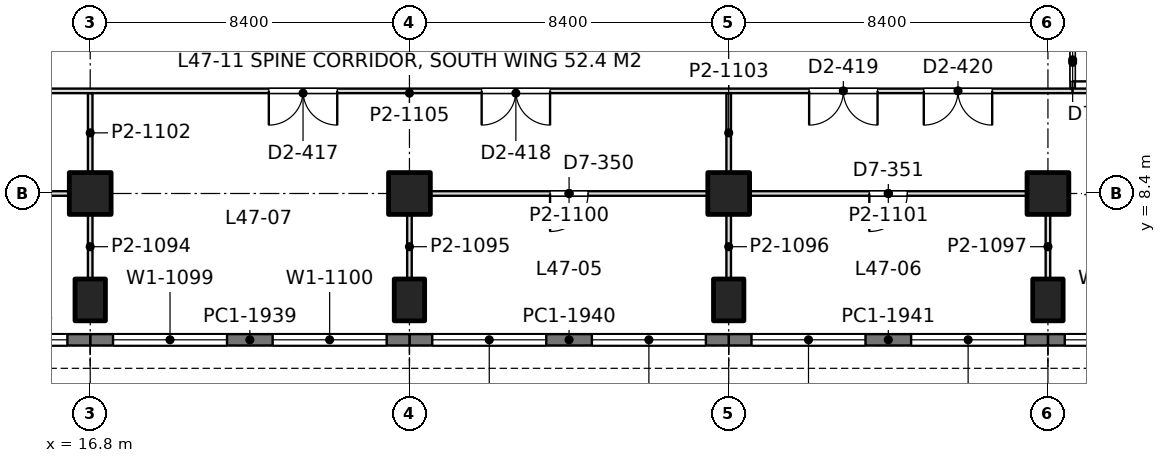
"""IFC4 building model, lengths in metres.
Left out: names, types, materials, properties, quantities, classifications, styles, units other than length and angle.
Written with IfcOpenShell. Run it as: python <this file> out.ifc"""

import sys

from ifc_helpers import new_model, si_unit, direction, frame, frame_2d, origin, origin_2d, place, context, subcontext, project, spatial, rectangle, extrude, element, fill, save


model = new_model("IFC4")
c1 = context("Model", 3, precision=1e-05, world=origin(), true_north=direction((0.0, 1.0)))
c2 = subcontext(c1, "Body", "Model", "MODEL_VIEW")
j1 = project(units=[si_unit("LENGTHUNIT", "METRE"), si_unit("PLANEANGLEUNIT", "RADIAN")], contexts=[c1])
p1 = place(None, origin())
s1 = spatial("IfcSite", under=j1, at=p1, CompositionType="ELEMENT")
p2 = place(p1, origin())
s2 = spatial("IfcBuilding", under=s1, at=p2, CompositionType="ELEMENT")
p3 = place(p2, frame((0.0, 0.0, 207.0)))
s3 = spatial("IfcBuildingStorey", under=s2, at=p3, CompositionType="ELEMENT", Elevation=207.0)
p4 = place(p3, frame((16.8, 5.6, 0.0), z_axis=(0.0, 0.0, 1.0), x_axis=(1.0, 0.0, 0.0)))
e1 = element("IfcColumn", 1, at=p4, inside=s3, PredefinedType="COLUMN", context=c2, shape_type="SweptSolid", body=[
    extrude(rectangle(XDim=0.8, YDim=1.1, at=origin_2d()), origin(), (0.0, 0.0, 1.0), 4.2),
])
p5 = place(p3, frame((16.8, 8.4, 0.0), z_axis=(0.0, 0.0, 1.0), x_axis=(1.0, 0.0, 0.0)))
e2 = element("IfcColumn", 2, at=p5, inside=s3, PredefinedType="COLUMN", context=c2, shape_type="SweptSolid", body=[
    extrude(rectangle(XDim=1.1, YDim=1.1, at=origin_2d()), origin(), (0.0, 0.0, 1.0), 4.2),
])
p6 = place(p3, frame((25.2, 5.6, 0.0), z_axis=(0.0, 0.0, 1.0), x_axis=(1.0, 0.0, 0.0)))
e3 = element("IfcColumn", 3, at=p6, inside=s3, PredefinedType="COLUMN", context=c2, shape_type="SweptSolid", body=[
    extrude(rectangle(XDim=0.8, YDim=1.1, at=origin_2d()), origin(), (0.0, 0.0, 1.0), 4.2),
])
p7 = place(p3, frame((25.2, 8.4, 0.0), z_axis=(0.0, 0.0, 1.0), x_axis=(1.0, 0.0, 0.0)))
e4 = element("IfcColumn", 4, at=p7, inside=s3, PredefinedType="COLUMN", context=c2, shape_type="SweptSolid", body=[
    extrude(rectangle(XDim=1.1, YDim=1.1, at=origin_2d()), origin(), (0.0, 0.0, 1.0), 4.2),
])
p8 = place(p3, frame((33.6, 5.6, 0.0), z_axis=(0.0, 0.0, 1.0), x_axis=(1.0, 0.0, 0.0)))
e5 = element("IfcColumn", 5, at=p8, inside=s3, PredefinedType="COLUMN", context=c2, shape_type="SweptSolid", body=[
    extrude(rectangle(XDim=0.8, YDim=1.1, at=origin_2d()), origin(), (0.0, 0.0, 1.0), 4.2),
])
p9 = place(p3, frame((33.6, 8.4, 0.0), z_axis=(0.0, 0.0, 1.0), x_axis=(1.0, 0.0, 0.0)))
e6 = element("IfcColumn", 6, at=p9, inside=s3, PredefinedType="COLUMN", context=c2, shape_type="SweptSolid", body=[
    extrude(rectangle(XDim=1.1, YDim=1.1, at=origin_2d()), origin(), (0.0, 0.0, 1.0), 4.2),
])
p10 = place(p3, frame((42.0, 5.6, 0.0), z_axis=(0.0, 0.0, 1.0), x_axis=(1.0, 0.0, 0.0)))
e7 = element("IfcColumn", 7, at=p10, inside=s3, PredefinedType="COLUMN", context=c2, shape_type="SweptSolid", body=[
    extrude(rectangle(XDim=0.8, YDim=1.1, at=origin_2d()), origin(), (0.0, 0.0, 1.0), 4.2),
])
p11 = place(p3, frame((42.0, 8.4, 0.0), z_axis=(0.0, 0.0, 1.0), x_axis=(1.0, 0.0, 0.0)))
e8 = element("IfcColumn", 8, at=p11, inside=s3, PredefinedType="COLUMN", context=c2, shape_type="SweptSolid", body=[
    extrude(rectangle(XDim=1.1, YDim=1.1, at=origin_2d()), origin(), (0.0, 0.0, 1.0), 4.2),
])
p12 = place(p3, frame((50.085, 4.55, 0.0), z_axis=(0.0, 0.0, 1.0), x_axis=(-1.0, 0.0, 0.0)))
e9 = element("IfcWall", 9, at=p12, inside=s3, PredefinedType="SOLIDWALL", context=c2, shape_type="SweptSolid", body=[
    extrude(rectangle(XDim=8.085, YDim=0.3, at=frame_2d((4.042, 0.0))), origin(), (0.0, 0.0, 1.0), 4.05),
])
p13 = place(p12, frame((0.443, 0.0, 0.9)))
e10 = element("IfcOpeningElement", 10, at=p13, cuts=e9, PredefinedType="OPENING", context=c2, shape_type="SweptSolid", body=[
    extrude(rectangle(XDim=3.0, YDim=1.9, at=frame_2d((1.5, 0.95))), frame((0.0, 0.16, 0.0), z_axis=(0.0, -1.0, 0.0), x_axis=(1.0, 0.0, 0.0)), (0.0, 0.0, 1.0), 0.32),
])
p14 = place(p12, frame((4.643, 0.0, 0.9)))
e11 = element("IfcOpeningElement", 11, at=p14, cuts=e9, PredefinedType="OPENING", context=c2, shape_type="SweptSolid", body=[
    extrude(rectangle(XDim=3.0, YDim=1.9, at=frame_2d((1.5, 0.95))), frame((0.0, 0.16, 0.0), z_axis=(0.0, -1.0, 0.0), x_axis=(1.0, 0.0, 0.0)), (0.0, 0.0, 1.0), 0.32),
])
p15 = place(p3, frame((42.0, 4.55, 0.0), z_axis=(0.0, 0.0, 1.0), x_axis=(-1.0, 0.0, 0.0)))
e12 = element("IfcWall", 12, at=p15, inside=s3, PredefinedType="SOLIDWALL", context=c2, shape_type="SweptSolid", body=[
    extrude(rectangle(XDim=8.4, YDim=0.3, at=frame_2d((4.2, 0.0))), origin(), (0.0, 0.0, 1.0), 4.05),
])
p16 = place(p15, frame((0.6, 0.0, 0.9)))
e13 = element("IfcOpeningElement", 13, at=p16, cuts=e12, PredefinedType="OPENING", context=c2, shape_type="SweptSolid", body=[
    extrude(rectangle(XDim=3.0, YDim=1.9, at=frame_2d((1.5, 0.95))), frame((0.0, 0.16, 0.0), z_axis=(0.0, -1.0, 0.0), x_axis=(1.0, 0.0, 0.0)), (0.0, 0.0, 1.0), 0.32),
])
p17 = place(p15, frame((4.8, 0.0, 0.9)))
e14 = element("IfcOpeningElement", 14, at=p17, cuts=e12, PredefinedType="OPENING", context=c2, shape_type="SweptSolid", body=[
    extrude(rectangle(XDim=3.0, YDim=1.9, at=frame_2d((1.5, 0.95))), frame((0.0, 0.16, 0.0), z_axis=(0.0, -1.0, 0.0), x_axis=(1.0, 0.0, 0.0)), (0.0, 0.0, 1.0), 0.32),
])
p18 = place(p3, frame((33.6, 4.55, 0.0), z_axis=(0.0, 0.0, 1.0), x_axis=(-1.0, 0.0, 0.0)))
e15 = element("IfcWall", 15, at=p18, inside=s3, PredefinedType="SOLIDWALL", context=c2, shape_type="SweptSolid", body=[
    extrude(rectangle(XDim=8.4, YDim=0.3, at=frame_2d((4.2, 0.0))), origin(), (0.0, 0.0, 1.0), 4.05),
])
p19 = place(p18, frame((0.6, 0.0, 0.9)))
e16 = element("IfcOpeningElement", 16, at=p19, cuts=e15, PredefinedType="OPENING", context=c2, shape_type="SweptSolid", body=[
    extrude(rectangle(XDim=3.0, YDim=1.9, at=frame_2d((1.5, 0.95))), frame((0.0, 0.16, 0.0), z_axis=(0.0, -1.0, 0.0), x_axis=(1.0, 0.0, 0.0)), (0.0, 0.0, 1.0), 0.32),
])
p20 = place(p18, frame((4.8, 0.0, 0.9)))
e17 = element("IfcOpeningElement", 17, at=p20, cuts=e15, PredefinedType="OPENING", context=c2, shape_type="SweptSolid", body=[
    extrude(rectangle(XDim=3.0, YDim=1.9, at=frame_2d((1.5, 0.95))), frame((0.0, 0.16, 0.0), z_axis=(0.0, -1.0, 0.0), x_axis=(1.0, 0.0, 0.0)), (0.0, 0.0, 1.0), 0.32),
])
p21 = place(p3, frame((25.2, 4.55, 0.0), z_axis=(0.0, 0.0, 1.0), x_axis=(-1.0, 0.0, 0.0)))
e18 = element("IfcWall", 18, at=p21, inside=s3, PredefinedType="SOLIDWALL", context=c2, shape_type="SweptSolid", body=[
    extrude(rectangle(XDim=8.4, YDim=0.3, at=frame_2d((4.2, 0.0))), origin(), (0.0, 0.0, 1.0), 4.05),
])
p22 = place(p21, frame((0.6, 0.0, 0.9)))
e19 = element("IfcOpeningElement", 19, at=p22, cuts=e18, PredefinedType="OPENING", context=c2, shape_type="SweptSolid", body=[
    extrude(rectangle(XDim=3.0, YDim=1.9, at=frame_2d((1.5, 0.95))), frame((0.0, 0.16, 0.0), z_axis=(0.0, -1.0, 0.0), x_axis=(1.0, 0.0, 0.0)), (0.0, 0.0, 1.0), 0.32),
])
p23 = place(p21, frame((4.8, 0.0, 0.9)))
e20 = element("IfcOpeningElement", 20, at=p23, cuts=e18, PredefinedType="OPENING", context=c2, shape_type="SweptSolid", body=[
    extrude(rectangle(XDim=3.0, YDim=1.9, at=frame_2d((1.5, 0.95))), frame((0.0, 0.16, 0.0), z_axis=(0.0, -1.0, 0.0), x_axis=(1.0, 0.0, 0.0)), (0.0, 0.0, 1.0), 0.32),
])
p24 = place(p3, frame((16.8, 4.55, 0.0), z_axis=(0.0, 0.0, 1.0), x_axis=(-1.0, 0.0, 0.0)))
e21 = element("IfcWall", 21, at=p24, inside=s3, PredefinedType="SOLIDWALL", context=c2, shape_type="SweptSolid", body=[
    extrude(rectangle(XDim=8.4, YDim=0.3, at=frame_2d((4.2, 0.0))), origin(), (0.0, 0.0, 1.0), 4.05),
])
p25 = place(p24, frame((0.6, 0.0, 0.9)))
e22 = element("IfcOpeningElement", 22, at=p25, cuts=e21, PredefinedType="OPENING", context=c2, shape_type="SweptSolid", body=[
    extrude(rectangle(XDim=3.0, YDim=1.9, at=frame_2d((1.5, 0.95))), frame((0.0, 0.16, 0.0), z_axis=(0.0, -1.0, 0.0), x_axis=(1.0, 0.0, 0.0)), (0.0, 0.0, 1.0), 0.32),
])
p26 = place(p24, frame((4.8, 0.0, 0.9)))
e23 = element("IfcOpeningElement", 23, at=p26, cuts=e21, PredefinedType="OPENING", context=c2, shape_type="SweptSolid", body=[
    extrude(rectangle(XDim=3.0, YDim=1.9, at=frame_2d((1.5, 0.95))), frame((0.0, 0.16, 0.0), z_axis=(0.0, -1.0, 0.0), x_axis=(1.0, 0.0, 0.0)), (0.0, 0.0, 1.0), 0.32),
])
p27 = place(p3, frame((8.949, 8.4, 0.0), z_axis=(0.0, 0.0, 1.0), x_axis=(1.0, 0.0, 0.0)))
e24 = element("IfcWall", 24, at=p27, inside=s3, PredefinedType="PARTITIONING", context=c2, shape_type="SweptSolid", body=[
    extrude(rectangle(XDim=7.302, YDim=0.12, at=frame_2d((3.651, 0.0))), origin(), (0.0, 0.0, 1.0), 3.55),
])
p28 = place(p27, frame((1.051, 0.0, 0.0)))
e25 = element("IfcOpeningElement", 25, at=p28, cuts=e24, PredefinedType="OPENING", context=c2, shape_type="SweptSolid", body=[
    extrude(rectangle(XDim=1.0, YDim=2.4, at=frame_2d((0.5, 1.2))), frame((0.0, 0.07, 0.0), z_axis=(0.0, -1.0, 0.0), x_axis=(1.0, 0.0, 0.0)), (0.0, 0.0, 1.0), 0.14),
])
p29 = place(p27, frame((5.251, 0.0, 0.0)))
e26 = element("IfcOpeningElement", 26, at=p29, cuts=e24, PredefinedType="OPENING", context=c2, shape_type="SweptSolid", body=[
    extrude(rectangle(XDim=1.0, YDim=2.4, at=frame_2d((0.5, 1.2))), frame((0.0, 0.07, 0.0), z_axis=(0.0, -1.0, 0.0), x_axis=(1.0, 0.0, 0.0)), (0.0, 0.0, 1.0), 0.14),
])
p30 = place(p3, frame((16.8, 6.149, 0.0), z_axis=(0.0, 0.0, 1.0), x_axis=(0.0, 1.0, 0.0)))
e27 = element("IfcWall", 27, at=p30, inside=s3, PredefinedType="PARTITIONING", context=c2, shape_type="SweptSolid", body=[
    extrude(rectangle(XDim=1.702, YDim=0.12, at=frame_2d((0.851, 0.0))), origin(), (0.0, 0.0, 1.0), 3.69),
])
p31 = place(p3, frame((25.749, 8.4, 0.0), z_axis=(0.0, 0.0, 1.0), x_axis=(1.0, 0.0, 0.0)))
e28 = element("IfcWall", 28, at=p31, inside=s3, PredefinedType="PARTITIONING", context=c2, shape_type="SweptSolid", body=[
    extrude(rectangle(XDim=7.302, YDim=0.12, at=frame_2d((3.651, 0.0))), origin(), (0.0, 0.0, 1.0), 3.55),
])
p32 = place(p31, frame((3.151, 0.0, 0.0)))
e29 = element("IfcOpeningElement", 29, at=p32, cuts=e28, PredefinedType="OPENING", context=c2, shape_type="SweptSolid", body=[
    extrude(rectangle(XDim=1.0, YDim=2.4, at=frame_2d((0.5, 1.2))), frame((0.0, 0.07, 0.0), z_axis=(0.0, -1.0, 0.0), x_axis=(1.0, 0.0, 0.0)), (0.0, 0.0, 1.0), 0.14),
])
p33 = place(p3, frame((34.149, 8.4, 0.0), z_axis=(0.0, 0.0, 1.0), x_axis=(1.0, 0.0, 0.0)))
e30 = element("IfcWall", 30, at=p33, inside=s3, PredefinedType="PARTITIONING", context=c2, shape_type="SweptSolid", body=[
    extrude(rectangle(XDim=7.302, YDim=0.12, at=frame_2d((3.651, 0.0))), origin(), (0.0, 0.0, 1.0), 3.55),
])
p34 = place(p33, frame((3.151, 0.0, 0.0)))
e31 = element("IfcOpeningElement", 31, at=p34, cuts=e30, PredefinedType="OPENING", context=c2, shape_type="SweptSolid", body=[
    extrude(rectangle(XDim=1.0, YDim=2.4, at=frame_2d((0.5, 1.2))), frame((0.0, 0.07, 0.0), z_axis=(0.0, -1.0, 0.0), x_axis=(1.0, 0.0, 0.0)), (0.0, 0.0, 1.0), 0.14),
])
for number, where, z_axis, x_axis in (
    (32, (25.2, 6.149, 0.0), (0.0, 0.0, 1.0), (0.0, 1.0, 0.0)),
    (33, (33.6, 6.149, 0.0), (0.0, 0.0, 1.0), (0.0, 1.0, 0.0)),
    (34, (42.0, 6.149, 0.0), (0.0, 0.0, 1.0), (0.0, 1.0, 0.0)),
):
    element("IfcWall", number, at=place(p3, frame(where, z_axis=z_axis, x_axis=x_axis)), inside=s3, PredefinedType="PARTITIONING", context=c2, shape_type="SweptSolid", body=[
        extrude(rectangle(XDim=1.702, YDim=0.12, at=frame_2d((0.851, 0.0))), origin(), (0.0, 0.0, 1.0), 3.69),
    ])
for number, where, z_axis, x_axis in (
    (35, (16.8, 8.949, 0.0), (0.0, 0.0, 1.0), (0.0, 1.0, 0.0)),
    (36, (33.6, 8.949, 0.0), (0.0, 0.0, 1.0), (0.0, 1.0, 0.0)),
):
    element("IfcWall", number, at=place(p3, frame(where, z_axis=z_axis, x_axis=x_axis)), inside=s3, PredefinedType="PARTITIONING", context=c2, shape_type="SweptSolid", body=[
        extrude(rectangle(XDim=2.093, YDim=0.12, at=frame_2d((1.046, 0.0))), origin(), (0.0, 0.0, 1.0), 3.69),
    ])
p35 = place(p3, frame((7.748, 11.1, 0.0), z_axis=(0.0, 0.0, 1.0), x_axis=(1.0, 0.0, 0.0)))
e37 = element("IfcWall", 37, at=p35, inside=s3, PredefinedType="PARTITIONING", context=c2, shape_type="SweptSolid", body=[
    extrude(rectangle(XDim=34.904, YDim=0.12, at=frame_2d((17.452, 0.0))), origin(), (0.0, 0.0, 1.0), 3.55),
])
p36 = place(p35, frame((2.119, 0.0, 0.0)))
e38 = element("IfcOpeningElement", 38, at=p36, cuts=e37, PredefinedType="OPENING", context=c2, shape_type="SweptSolid", body=[
    extrude(rectangle(XDim=1.8, YDim=2.2, at=frame_2d((0.9, 1.1))), frame((0.0, 0.07, 0.0), z_axis=(0.0, -1.0, 0.0), x_axis=(1.0, 0.0, 0.0)), (0.0, 0.0, 1.0), 0.14),
])
p37 = place(p35, frame((5.135, 0.0, 0.0)))
e39 = element("IfcOpeningElement", 39, at=p37, cuts=e37, PredefinedType="OPENING", context=c2, shape_type="SweptSolid", body=[
    extrude(rectangle(XDim=1.8, YDim=2.2, at=frame_2d((0.9, 1.1))), frame((0.0, 0.07, 0.0), z_axis=(0.0, -1.0, 0.0), x_axis=(1.0, 0.0, 0.0)), (0.0, 0.0, 1.0), 0.14),
])
p38 = place(p35, frame((13.752, 0.0, 0.0)))
e40 = element("IfcOpeningElement", 40, at=p38, cuts=e37, PredefinedType="OPENING", context=c2, shape_type="SweptSolid", body=[
    extrude(rectangle(XDim=1.8, YDim=2.2, at=frame_2d((0.9, 1.1))), frame((0.0, 0.07, 0.0), z_axis=(0.0, -1.0, 0.0), x_axis=(1.0, 0.0, 0.0)), (0.0, 0.0, 1.0), 0.14),
])
p39 = place(p35, frame((19.352, 0.0, 0.0)))
e41 = element("IfcOpeningElement", 41, at=p39, cuts=e37, PredefinedType="OPENING", context=c2, shape_type="SweptSolid", body=[
    extrude(rectangle(XDim=1.8, YDim=2.2, at=frame_2d((0.9, 1.1))), frame((0.0, 0.07, 0.0), z_axis=(0.0, -1.0, 0.0), x_axis=(1.0, 0.0, 0.0)), (0.0, 0.0, 1.0), 0.14),
])
p40 = place(p35, frame((27.969, 0.0, 0.0)))
e42 = element("IfcOpeningElement", 42, at=p40, cuts=e37, PredefinedType="OPENING", context=c2, shape_type="SweptSolid", body=[
    extrude(rectangle(XDim=1.8, YDim=2.2, at=frame_2d((0.9, 1.1))), frame((0.0, 0.07, 0.0), z_axis=(0.0, -1.0, 0.0), x_axis=(1.0, 0.0, 0.0)), (0.0, 0.0, 1.0), 0.14),
])
p41 = place(p35, frame((30.985, 0.0, 0.0)))
e43 = element("IfcOpeningElement", 43, at=p41, cuts=e37, PredefinedType="OPENING", context=c2, shape_type="SweptSolid", body=[
    extrude(rectangle(XDim=1.8, YDim=2.2, at=frame_2d((0.9, 1.1))), frame((0.0, 0.07, 0.0), z_axis=(0.0, -1.0, 0.0), x_axis=(1.0, 0.0, 0.0)), (0.0, 0.0, 1.0), 0.14),
])
p42 = place(p3, frame((42.65, 11.158, 0.0), z_axis=(0.0, 0.0, 1.0), x_axis=(0.0, 1.0, 0.0)))
e44 = element("IfcWall", 44, at=p42, inside=s3, PredefinedType="PARTITIONING", context=c2, shape_type="SweptSolid", body=[
    extrude(rectangle(XDim=1.518, YDim=0.12, at=frame_2d((0.759, 0.0))), origin(), (0.0, 0.0, 1.0), 4.05),
])
p43 = place(p42, frame((0.192, 0.0, 0.0)))
e45 = element("IfcOpeningElement", 45, at=p43, cuts=e44, PredefinedType="OPENING", context=c2, shape_type="SweptSolid", body=[
    extrude(rectangle(XDim=1.0, YDim=2.4, at=frame_2d((0.5, 1.2))), frame((0.0, 0.07, 0.0), z_axis=(0.0, -1.0, 0.0), x_axis=(1.0, 0.0, 0.0)), (0.0, 0.0, 1.0), 0.14),
])
p44 = place(p3, frame((42.648, 11.1, 0.0), z_axis=(0.0, 0.0, 1.0), x_axis=(1.0, 0.0, 0.0)))
e46 = element("IfcWall", 46, at=p44, inside=s3, PredefinedType="PARTITIONING", context=c2, shape_type="SweptSolid", body=[
    extrude(rectangle(XDim=6.552, YDim=0.12, at=frame_2d((3.276, 0.0))), origin(), (0.0, 0.0, 1.0), 4.05),
])
p45 = place(p14, origin())
e47 = element("IfcWindow", 47, at=p45, inside=s3, PartitioningType="SINGLE_PANEL", PredefinedType="WINDOW", context=c2, shape_type="SweptSolid", body=[
    extrude(rectangle(XDim=3.0, YDim=1.9, at=frame_2d((1.5, 0.95))), frame((0.0, 0.03, 0.0), z_axis=(0.0, -1.0, 0.0), x_axis=(1.0, 0.0, 0.0)), (0.0, 0.0, 1.0), 0.06),
])
fill(e11, e47)
p46 = place(p16, origin())
e48 = element("IfcWindow", 48, at=p46, inside=s3, PartitioningType="SINGLE_PANEL", PredefinedType="WINDOW", context=c2, shape_type="SweptSolid", body=[
    extrude(rectangle(XDim=3.0, YDim=1.9, at=frame_2d((1.5, 0.95))), frame((0.0, 0.03, 0.0), z_axis=(0.0, -1.0, 0.0), x_axis=(1.0, 0.0, 0.0)), (0.0, 0.0, 1.0), 0.06),
])
fill(e13, e48)
p47 = place(p17, origin())
e49 = element("IfcWindow", 49, at=p47, inside=s3, PartitioningType="SINGLE_PANEL", PredefinedType="WINDOW", context=c2, shape_type="SweptSolid", body=[
    extrude(rectangle(XDim=3.0, YDim=1.9, at=frame_2d((1.5, 0.95))), frame((0.0, 0.03, 0.0), z_axis=(0.0, -1.0, 0.0), x_axis=(1.0, 0.0, 0.0)), (0.0, 0.0, 1.0), 0.06),
])
fill(e14, e49)
p48 = place(p19, origin())
e50 = element("IfcWindow", 50, at=p48, inside=s3, PartitioningType="SINGLE_PANEL", PredefinedType="WINDOW", context=c2, shape_type="SweptSolid", body=[
    extrude(rectangle(XDim=3.0, YDim=1.9, at=frame_2d((1.5, 0.95))), frame((0.0, 0.03, 0.0), z_axis=(0.0, -1.0, 0.0), x_axis=(1.0, 0.0, 0.0)), (0.0, 0.0, 1.0), 0.06),
])
fill(e16, e50)
p49 = place(p20, origin())
e51 = element("IfcWindow", 51, at=p49, inside=s3, PartitioningType="SINGLE_PANEL", PredefinedType="WINDOW", context=c2, shape_type="SweptSolid", body=[
    extrude(rectangle(XDim=3.0, YDim=1.9, at=frame_2d((1.5, 0.95))), frame((0.0, 0.03, 0.0), z_axis=(0.0, -1.0, 0.0), x_axis=(1.0, 0.0, 0.0)), (0.0, 0.0, 1.0), 0.06),
])
fill(e17, e51)
p50 = place(p22, origin())
e52 = element("IfcWindow", 52, at=p50, inside=s3, PartitioningType="SINGLE_PANEL", PredefinedType="WINDOW", context=c2, shape_type="SweptSolid", body=[
    extrude(rectangle(XDim=3.0, YDim=1.9, at=frame_2d((1.5, 0.95))), frame((0.0, 0.03, 0.0), z_axis=(0.0, -1.0, 0.0), x_axis=(1.0, 0.0, 0.0)), (0.0, 0.0, 1.0), 0.06),
])
fill(e19, e52)
p51 = place(p23, origin())
e53 = element("IfcWindow", 53, at=p51, inside=s3, PartitioningType="SINGLE_PANEL", PredefinedType="WINDOW", context=c2, shape_type="SweptSolid", body=[
    extrude(rectangle(XDim=3.0, YDim=1.9, at=frame_2d((1.5, 0.95))), frame((0.0, 0.03, 0.0), z_axis=(0.0, -1.0, 0.0), x_axis=(1.0, 0.0, 0.0)), (0.0, 0.0, 1.0), 0.06),
])
fill(e20, e53)
p52 = place(p25, origin())
e54 = element("IfcWindow", 54, at=p52, inside=s3, PartitioningType="SINGLE_PANEL", PredefinedType="WINDOW", context=c2, shape_type="SweptSolid", body=[
    extrude(rectangle(XDim=3.0, YDim=1.9, at=frame_2d((1.5, 0.95))), frame((0.0, 0.03, 0.0), z_axis=(0.0, -1.0, 0.0), x_axis=(1.0, 0.0, 0.0)), (0.0, 0.0, 1.0), 0.06),
])
fill(e22, e54)
p53 = place(p32, frame((1.0, 0.0, 0.0), z_axis=(0.0, 0.0, 1.0), x_axis=(-1.0, 0.0, 0.0)))
e55 = element("IfcDoor", 55, at=p53, inside=s3, OperationType="SINGLE_SWING_RIGHT", PredefinedType="DOOR", context=c2, shape_type="SweptSolid", body=[
    extrude(rectangle(XDim=1.0, YDim=2.4, at=frame_2d((0.5, 1.2))), frame((0.0, 0.025, 0.0), z_axis=(0.0, -1.0, 0.0), x_axis=(1.0, 0.0, 0.0)), (0.0, 0.0, 1.0), 0.05),
])
fill(e29, e55)
p54 = place(p34, frame((1.0, 0.0, 0.0), z_axis=(0.0, 0.0, 1.0), x_axis=(-1.0, 0.0, 0.0)))
e56 = element("IfcDoor", 56, at=p54, inside=s3, OperationType="SINGLE_SWING_RIGHT", PredefinedType="DOOR", context=c2, shape_type="SweptSolid", body=[
    extrude(rectangle(XDim=1.0, YDim=2.4, at=frame_2d((0.5, 1.2))), frame((0.0, 0.025, 0.0), z_axis=(0.0, -1.0, 0.0), x_axis=(1.0, 0.0, 0.0)), (0.0, 0.0, 1.0), 0.05),
])
fill(e31, e56)
p55 = place(p38, frame((1.8, 0.0, 0.0), z_axis=(0.0, 0.0, 1.0), x_axis=(-1.0, 0.0, 0.0)))
e57 = element("IfcDoor", 57, at=p55, inside=s3, OperationType="DOUBLE_DOOR_SINGLE_SWING", PredefinedType="DOOR", context=c2, shape_type="SweptSolid", body=[
    extrude(rectangle(XDim=1.8, YDim=2.2, at=frame_2d((0.9, 1.1))), frame((0.0, 0.025, 0.0), z_axis=(0.0, -1.0, 0.0), x_axis=(1.0, 0.0, 0.0)), (0.0, 0.0, 1.0), 0.05),
])
fill(e40, e57)
p56 = place(p39, frame((1.8, 0.0, 0.0), z_axis=(0.0, 0.0, 1.0), x_axis=(-1.0, 0.0, 0.0)))
e58 = element("IfcDoor", 58, at=p56, inside=s3, OperationType="DOUBLE_DOOR_SINGLE_SWING", PredefinedType="DOOR", context=c2, shape_type="SweptSolid", body=[
    extrude(rectangle(XDim=1.8, YDim=2.2, at=frame_2d((0.9, 1.1))), frame((0.0, 0.025, 0.0), z_axis=(0.0, -1.0, 0.0), x_axis=(1.0, 0.0, 0.0)), (0.0, 0.0, 1.0), 0.05),
])
fill(e41, e58)
p57 = place(p40, frame((1.8, 0.0, 0.0), z_axis=(0.0, 0.0, 1.0), x_axis=(-1.0, 0.0, 0.0)))
e59 = element("IfcDoor", 59, at=p57, inside=s3, OperationType="DOUBLE_DOOR_SINGLE_SWING", PredefinedType="DOOR", context=c2, shape_type="SweptSolid", body=[
    extrude(rectangle(XDim=1.8, YDim=2.2, at=frame_2d((0.9, 1.1))), frame((0.0, 0.025, 0.0), z_axis=(0.0, -1.0, 0.0), x_axis=(1.0, 0.0, 0.0)), (0.0, 0.0, 1.0), 0.05),
])
fill(e42, e59)
p58 = place(p41, frame((1.8, 0.0, 0.0), z_axis=(0.0, 0.0, 1.0), x_axis=(-1.0, 0.0, 0.0)))
e60 = element("IfcDoor", 60, at=p58, inside=s3, OperationType="DOUBLE_DOOR_SINGLE_SWING", PredefinedType="DOOR", context=c2, shape_type="SweptSolid", body=[
    extrude(rectangle(XDim=1.8, YDim=2.2, at=frame_2d((0.9, 1.1))), frame((0.0, 0.025, 0.0), z_axis=(0.0, -1.0, 0.0), x_axis=(1.0, 0.0, 0.0)), (0.0, 0.0, 1.0), 0.05),
])
fill(e43, e60)
p59 = place(p43, frame((1.0, 0.0, 0.0), z_axis=(0.0, 0.0, 1.0), x_axis=(-1.0, 0.0, 0.0)))
e61 = element("IfcDoor", 61, at=p59, inside=s3, OperationType="SINGLE_SWING_RIGHT", PredefinedType="DOOR", context=c2, shape_type="SweptSolid", body=[
    extrude(rectangle(XDim=1.0, YDim=2.4, at=frame_2d((0.5, 1.2))), frame((0.0, 0.025, 0.0), z_axis=(0.0, -1.0, 0.0), x_axis=(1.0, 0.0, 0.0)), (0.0, 0.0, 1.0), 0.05),
])
fill(e45, e61)
save(model, sys.argv[1])
